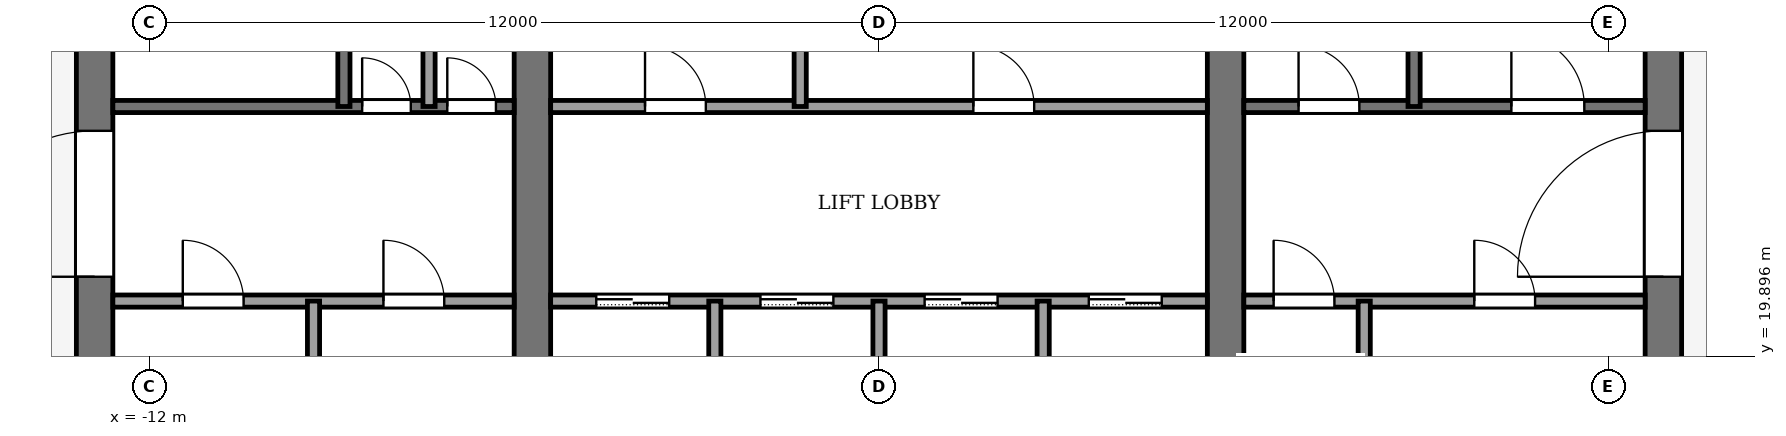
"""IFC4 building model, lengths in metres.
Left out: names, types, materials, properties, quantities, classifications, styles, units other than length and angle.
Written with IfcOpenShell. Run it as: python <this file> out.ifc"""

import sys

from ifc_helpers import new_model, si_unit, direction, frame, frame_2d, origin, place, context, subcontext, project, spatial, rectangle, extrude, element, fill, save


model = new_model("IFC4")
c1 = context("Model", 3, precision=1e-05, world=origin(), true_north=direction((0.0, 1.0)))
c2 = subcontext(c1, "Body", "Model", "MODEL_VIEW")
j1 = project(units=[si_unit("LENGTHUNIT", "METRE"), si_unit("PLANEANGLEUNIT", "RADIAN")], contexts=[c1])
p1 = place(None, origin())
s1 = spatial("IfcSite", under=j1, at=p1, CompositionType="ELEMENT")
p2 = place(p1, origin())
s2 = spatial("IfcBuilding", under=s1, at=p2, CompositionType="ELEMENT")
p3 = place(p2, frame((0.0, 0.0, 318.0)))
s3 = spatial("IfcBuildingStorey", under=s2, at=p3, CompositionType="ELEMENT", Elevation=318.0)
p4 = place(p3, frame((-12.9, 18.4, -0.13), z_axis=(0.0, 0.0, 1.0), x_axis=(0.0, 1.0, 0.0)))
e1 = element("IfcWall", 1, at=p4, inside=s3, PredefinedType="SHEAR", context=c2, shape_type="SweptSolid", body=[
    extrude(rectangle(XDim=19.2, YDim=0.6, at=frame_2d((9.6, 0.0))), origin(), (0.0, 0.0, 1.0), 4.0),
])
p5 = place(p4, frame((2.8, 0.0, 0.13)))
e2 = element("IfcOpeningElement", 2, at=p5, cuts=e1, PredefinedType="OPENING", context=c2, shape_type="SweptSolid", body=[
    extrude(rectangle(XDim=2.4, YDim=2.4, at=frame_2d((1.2, 1.2))), frame((0.0, 0.31, 0.0), z_axis=(0.0, -1.0, 0.0), x_axis=(1.0, 0.0, 0.0)), (0.0, 0.0, 1.0), 0.62),
])
p6 = place(p4, frame((13.4, 0.0, 0.13)))
e3 = element("IfcOpeningElement", 3, at=p6, cuts=e1, PredefinedType="OPENING", context=c2, shape_type="SweptSolid", body=[
    extrude(rectangle(XDim=1.4, YDim=2.2, at=frame_2d((0.7, 1.1))), frame((0.0, 0.31, 0.0), z_axis=(0.0, -1.0, 0.0), x_axis=(1.0, 0.0, 0.0)), (0.0, 0.0, 1.0), 0.62),
])
p7 = place(p3, frame((12.9, 18.4, -0.13), z_axis=(0.0, 0.0, 1.0), x_axis=(0.0, 1.0, 0.0)))
e4 = element("IfcWall", 4, at=p7, inside=s3, PredefinedType="SHEAR", context=c2, shape_type="SweptSolid", body=[
    extrude(rectangle(XDim=19.2, YDim=0.6, at=frame_2d((9.6, 0.0))), origin(), (0.0, 0.0, 1.0), 4.0),
])
p8 = place(p7, frame((2.8, 0.0, 0.13)))
e5 = element("IfcOpeningElement", 5, at=p8, cuts=e4, PredefinedType="OPENING", context=c2, shape_type="SweptSolid", body=[
    extrude(rectangle(XDim=2.4, YDim=2.4, at=frame_2d((1.2, 1.2))), frame((0.0, 0.31, 0.0), z_axis=(0.0, -1.0, 0.0), x_axis=(1.0, 0.0, 0.0)), (0.0, 0.0, 1.0), 0.62),
])
p9 = place(p7, frame((13.3, 0.0, 0.13)))
e6 = element("IfcOpeningElement", 6, at=p9, cuts=e4, PredefinedType="OPENING", context=c2, shape_type="SweptSolid", body=[
    extrude(rectangle(XDim=2.4, YDim=2.4, at=frame_2d((1.2, 1.2))), frame((0.0, 0.31, 0.0), z_axis=(0.0, -1.0, 0.0), x_axis=(1.0, 0.0, 0.0)), (0.0, 0.0, 1.0), 0.62),
])
p10 = place(p3, frame((-5.7, 18.4, -0.13), z_axis=(0.0, 0.0, 1.0), x_axis=(0.0, 1.0, 0.0)))
e7 = element("IfcWall", 7, at=p10, inside=s3, PredefinedType="SHEAR", context=c2, shape_type="SweptSolid", body=[
    extrude(rectangle(XDim=19.2, YDim=0.6, at=frame_2d((9.6, 0.0))), origin(), (0.0, 0.0, 1.0), 4.0),
])
p11 = place(p10, frame((8.35, 0.0, 0.13)))
e8 = element("IfcOpeningElement", 8, at=p11, cuts=e7, PredefinedType="OPENING", context=c2, shape_type="SweptSolid", body=[
    extrude(rectangle(XDim=0.9, YDim=2.1, at=frame_2d((0.45, 1.05))), frame((0.0, 0.31, 0.0), z_axis=(0.0, -1.0, 0.0), x_axis=(1.0, 0.0, 0.0)), (0.0, 0.0, 1.0), 0.62),
])
p12 = place(p3, frame((5.7, 18.4, -0.13), z_axis=(0.0, 0.0, 1.0), x_axis=(0.0, 1.0, 0.0)))
e9 = element("IfcWall", 9, at=p12, inside=s3, PredefinedType="SHEAR", context=c2, shape_type="SweptSolid", body=[
    extrude(rectangle(XDim=19.2, YDim=0.6, at=frame_2d((9.6, 0.0))), origin(), (0.0, 0.0, 1.0), 4.0),
])
p13 = place(p12, frame((8.35, 0.0, 0.13)))
e10 = element("IfcOpeningElement", 10, at=p13, cuts=e9, PredefinedType="OPENING", context=c2, shape_type="SweptSolid", body=[
    extrude(rectangle(XDim=0.9, YDim=2.1, at=frame_2d((0.45, 1.05))), frame((0.0, 0.31, 0.0), z_axis=(0.0, -1.0, 0.0), x_axis=(1.0, 0.0, 0.0)), (0.0, 0.0, 1.0), 0.62),
])
p14 = place(p12, frame((13.3, 0.0, 0.13)))
e11 = element("IfcOpeningElement", 11, at=p14, cuts=e9, PredefinedType="OPENING", context=c2, shape_type="SweptSolid", body=[
    extrude(rectangle(XDim=2.4, YDim=2.4, at=frame_2d((1.2, 1.2))), frame((0.0, 0.31, 0.0), z_axis=(0.0, -1.0, 0.0), x_axis=(1.0, 0.0, 0.0)), (0.0, 0.0, 1.0), 0.62),
])
p15 = place(p3, frame((-12.6, 20.8, 0.0), z_axis=(0.0, 0.0, 1.0), x_axis=(1.0, 0.0, 0.0)))
e12 = element("IfcWall", 12, at=p15, inside=s3, PredefinedType="PARTITIONING", context=c2, shape_type="SweptSolid", body=[
    extrude(rectangle(XDim=6.6, YDim=0.2, at=frame_2d((3.3, 0.0))), origin(), (0.0, 0.0, 1.0), 3.87),
])
p16 = place(p15, frame((1.15, 0.0, 0.0)))
e13 = element("IfcOpeningElement", 13, at=p16, cuts=e12, PredefinedType="OPENING", context=c2, shape_type="SweptSolid", body=[
    extrude(rectangle(XDim=1.0, YDim=2.1, at=frame_2d((0.5, 1.05))), frame((0.0, 0.11, 0.0), z_axis=(0.0, -1.0, 0.0), x_axis=(1.0, 0.0, 0.0)), (0.0, 0.0, 1.0), 0.22),
])
p17 = place(p15, frame((4.45, 0.0, 0.0)))
e14 = element("IfcOpeningElement", 14, at=p17, cuts=e12, PredefinedType="OPENING", context=c2, shape_type="SweptSolid", body=[
    extrude(rectangle(XDim=1.0, YDim=2.1, at=frame_2d((0.5, 1.05))), frame((0.0, 0.11, 0.0), z_axis=(0.0, -1.0, 0.0), x_axis=(1.0, 0.0, 0.0)), (0.0, 0.0, 1.0), 0.22),
])
p18 = place(p3, frame((-5.4, 20.8, 0.0), z_axis=(0.0, 0.0, 1.0), x_axis=(1.0, 0.0, 0.0)))
e15 = element("IfcWall", 15, at=p18, inside=s3, PredefinedType="PARTITIONING", context=c2, shape_type="SweptSolid", body=[
    extrude(rectangle(XDim=10.8, YDim=0.2, at=frame_2d((5.4, 0.0))), origin(), (0.0, 0.0, 1.0), 3.87),
])
p19 = place(p18, frame((0.75, 0.0, 0.0)))
e16 = element("IfcOpeningElement", 16, at=p19, cuts=e15, PredefinedType="OPENING", context=c2, shape_type="SweptSolid", body=[
    extrude(rectangle(XDim=1.2, YDim=2.2, at=frame_2d((0.6, 1.1))), frame((0.0, 0.11, 0.0), z_axis=(0.0, -1.0, 0.0), x_axis=(1.0, 0.0, 0.0)), (0.0, 0.0, 1.0), 0.22),
])
p20 = place(p18, frame((3.45, 0.0, 0.0)))
e17 = element("IfcOpeningElement", 17, at=p20, cuts=e15, PredefinedType="OPENING", context=c2, shape_type="SweptSolid", body=[
    extrude(rectangle(XDim=1.2, YDim=2.2, at=frame_2d((0.6, 1.1))), frame((0.0, 0.11, 0.0), z_axis=(0.0, -1.0, 0.0), x_axis=(1.0, 0.0, 0.0)), (0.0, 0.0, 1.0), 0.22),
])
p21 = place(p18, frame((6.15, 0.0, 0.0)))
e18 = element("IfcOpeningElement", 18, at=p21, cuts=e15, PredefinedType="OPENING", context=c2, shape_type="SweptSolid", body=[
    extrude(rectangle(XDim=1.2, YDim=2.2, at=frame_2d((0.6, 1.1))), frame((0.0, 0.11, 0.0), z_axis=(0.0, -1.0, 0.0), x_axis=(1.0, 0.0, 0.0)), (0.0, 0.0, 1.0), 0.22),
])
p22 = place(p18, frame((8.85, 0.0, 0.0)))
e19 = element("IfcOpeningElement", 19, at=p22, cuts=e15, PredefinedType="OPENING", context=c2, shape_type="SweptSolid", body=[
    extrude(rectangle(XDim=1.2, YDim=2.2, at=frame_2d((0.6, 1.1))), frame((0.0, 0.11, 0.0), z_axis=(0.0, -1.0, 0.0), x_axis=(1.0, 0.0, 0.0)), (0.0, 0.0, 1.0), 0.22),
])
p23 = place(p3, frame((6.0, 20.8, 0.0), z_axis=(0.0, 0.0, 1.0), x_axis=(1.0, 0.0, 0.0)))
e20 = element("IfcWall", 20, at=p23, inside=s3, PredefinedType="PARTITIONING", context=c2, shape_type="SweptSolid", body=[
    extrude(rectangle(XDim=6.6, YDim=0.2, at=frame_2d((3.3, 0.0))), origin(), (0.0, 0.0, 1.0), 3.87),
])
p24 = place(p23, frame((0.49, 0.0, 0.0)))
e21 = element("IfcOpeningElement", 21, at=p24, cuts=e20, PredefinedType="OPENING", context=c2, shape_type="SweptSolid", body=[
    extrude(rectangle(XDim=1.0, YDim=2.1, at=frame_2d((0.5, 1.05))), frame((0.0, 0.11, 0.0), z_axis=(0.0, -1.0, 0.0), x_axis=(1.0, 0.0, 0.0)), (0.0, 0.0, 1.0), 0.22),
])
p25 = place(p23, frame((3.79, 0.0, 0.0)))
e22 = element("IfcOpeningElement", 22, at=p25, cuts=e20, PredefinedType="OPENING", context=c2, shape_type="SweptSolid", body=[
    extrude(rectangle(XDim=1.0, YDim=2.1, at=frame_2d((0.5, 1.05))), frame((0.0, 0.11, 0.0), z_axis=(0.0, -1.0, 0.0), x_axis=(1.0, 0.0, 0.0)), (0.0, 0.0, 1.0), 0.22),
])
p26 = place(p3, frame((-12.6, 24.0, 0.0), z_axis=(0.0, 0.0, 1.0), x_axis=(1.0, 0.0, 0.0)))
e23 = element("IfcWall", 23, at=p26, inside=s3, PredefinedType="PARTITIONING", context=c2, shape_type="SweptSolid", body=[
    extrude(rectangle(XDim=6.6, YDim=0.2, at=frame_2d((3.3, 0.0))), origin(), (0.0, 0.0, 1.0), 3.87),
])
p27 = place(p26, frame((4.1, 0.0, 0.0)))
e24 = element("IfcOpeningElement", 24, at=p27, cuts=e23, PredefinedType="OPENING", context=c2, shape_type="SweptSolid", body=[
    extrude(rectangle(XDim=0.8, YDim=2.1, at=frame_2d((0.4, 1.05))), frame((0.0, 0.11, 0.0), z_axis=(0.0, -1.0, 0.0), x_axis=(1.0, 0.0, 0.0)), (0.0, 0.0, 1.0), 0.22),
])
p28 = place(p26, frame((5.5, 0.0, 0.0)))
e25 = element("IfcOpeningElement", 25, at=p28, cuts=e23, PredefinedType="OPENING", context=c2, shape_type="SweptSolid", body=[
    extrude(rectangle(XDim=0.8, YDim=2.1, at=frame_2d((0.4, 1.05))), frame((0.0, 0.11, 0.0), z_axis=(0.0, -1.0, 0.0), x_axis=(1.0, 0.0, 0.0)), (0.0, 0.0, 1.0), 0.22),
])
p29 = place(p3, frame((-5.4, 24.0, 0.0), z_axis=(0.0, 0.0, 1.0), x_axis=(1.0, 0.0, 0.0)))
e26 = element("IfcWall", 26, at=p29, inside=s3, PredefinedType="PARTITIONING", context=c2, shape_type="SweptSolid", body=[
    extrude(rectangle(XDim=10.8, YDim=0.2, at=frame_2d((5.4, 0.0))), origin(), (0.0, 0.0, 1.0), 3.87),
])
p30 = place(p29, frame((1.552, 0.0, 0.0)))
e27 = element("IfcOpeningElement", 27, at=p30, cuts=e26, PredefinedType="OPENING", context=c2, shape_type="SweptSolid", body=[
    extrude(rectangle(XDim=1.0, YDim=2.1, at=frame_2d((0.5, 1.05))), frame((0.0, 0.11, 0.0), z_axis=(0.0, -1.0, 0.0), x_axis=(1.0, 0.0, 0.0)), (0.0, 0.0, 1.0), 0.22),
])
p31 = place(p29, frame((6.952, 0.0, 0.0)))
e28 = element("IfcOpeningElement", 28, at=p31, cuts=e26, PredefinedType="OPENING", context=c2, shape_type="SweptSolid", body=[
    extrude(rectangle(XDim=1.0, YDim=2.1, at=frame_2d((0.5, 1.05))), frame((0.0, 0.11, 0.0), z_axis=(0.0, -1.0, 0.0), x_axis=(1.0, 0.0, 0.0)), (0.0, 0.0, 1.0), 0.22),
])
p32 = place(p3, frame((6.0, 24.0, 0.0), z_axis=(0.0, 0.0, 1.0), x_axis=(1.0, 0.0, 0.0)))
e29 = element("IfcWall", 29, at=p32, inside=s3, PredefinedType="PARTITIONING", context=c2, shape_type="SweptSolid", body=[
    extrude(rectangle(XDim=6.6, YDim=0.2, at=frame_2d((3.3, 0.0))), origin(), (0.0, 0.0, 1.0), 3.87),
])
p33 = place(p32, frame((0.9, 0.0, 0.0)))
e30 = element("IfcOpeningElement", 30, at=p33, cuts=e29, PredefinedType="OPENING", context=c2, shape_type="SweptSolid", body=[
    extrude(rectangle(XDim=1.0, YDim=2.1, at=frame_2d((0.5, 1.05))), frame((0.0, 0.11, 0.0), z_axis=(0.0, -1.0, 0.0), x_axis=(1.0, 0.0, 0.0)), (0.0, 0.0, 1.0), 0.22),
])
p34 = place(p32, frame((4.4, 0.0, 0.0)))
e31 = element("IfcOpeningElement", 31, at=p34, cuts=e29, PredefinedType="OPENING", context=c2, shape_type="SweptSolid", body=[
    extrude(rectangle(XDim=1.2, YDim=2.2, at=frame_2d((0.6, 1.1))), frame((0.0, 0.11, 0.0), z_axis=(0.0, -1.0, 0.0), x_axis=(1.0, 0.0, 0.0)), (0.0, 0.0, 1.0), 0.22),
])
p35 = place(p3, frame((-9.3, 18.4, 0.0), z_axis=(0.0, 0.0, 1.0), x_axis=(0.0, 1.0, 0.0)))
e32 = element("IfcWall", 32, at=p35, inside=s3, PredefinedType="PARTITIONING", context=c2, shape_type="SweptSolid", body=[
    extrude(rectangle(XDim=2.4, YDim=0.2, at=frame_2d((1.2, 0.0))), origin(), (0.0, 0.0, 1.0), 3.87),
])
for number, where, z_axis, x_axis in (
    (33, (-8.8, 24.0, 0.0), (0.0, 0.0, 1.0), (0.0, 1.0, 0.0)),
    (34, (-7.4, 24.0, 0.0), (0.0, 0.0, 1.0), (0.0, 1.0, 0.0)),
):
    element("IfcWall", number, at=place(p3, frame(where, z_axis=z_axis, x_axis=x_axis)), inside=s3, PredefinedType="PARTITIONING", context=c2, shape_type="SweptSolid", body=[
        extrude(rectangle(XDim=7.4, YDim=0.2, at=frame_2d((3.7, 0.0))), origin(), (0.0, 0.0, 1.0), 3.87),
    ])
p36 = place(p3, frame((-2.7, 18.4, 0.0), z_axis=(0.0, 0.0, 1.0), x_axis=(0.0, 1.0, 0.0)))
e35 = element("IfcWall", 35, at=p36, inside=s3, PredefinedType="PARTITIONING", context=c2, shape_type="SweptSolid", body=[
    extrude(rectangle(XDim=2.4, YDim=0.2, at=frame_2d((1.2, 0.0))), origin(), (0.0, 0.0, 1.0), 3.87),
])
p37 = place(p3, frame((-1.296, 24.0, 0.0), z_axis=(0.0, 0.0, 1.0), x_axis=(0.0, 1.0, 0.0)))
e36 = element("IfcWall", 36, at=p37, inside=s3, PredefinedType="PARTITIONING", context=c2, shape_type="SweptSolid", body=[
    extrude(rectangle(XDim=2.4, YDim=0.2, at=frame_2d((1.2, 0.0))), origin(), (0.0, 0.0, 1.0), 3.87),
])
for number, where, z_axis, x_axis in (
    (37, (0.0, 18.4, 0.0), (0.0, 0.0, 1.0), (0.0, 1.0, 0.0)),
    (38, (2.7, 18.4, 0.0), (0.0, 0.0, 1.0), (0.0, 1.0, 0.0)),
    (39, (7.98, 18.4, 0.0), (0.0, 0.0, 1.0), (0.0, 1.0, 0.0)),
):
    element("IfcWall", number, at=place(p3, frame(where, z_axis=z_axis, x_axis=x_axis)), inside=s3, PredefinedType="PARTITIONING", context=c2, shape_type="SweptSolid", body=[
        extrude(rectangle(XDim=2.4, YDim=0.2, at=frame_2d((1.2, 0.0))), origin(), (0.0, 0.0, 1.0), 3.87),
    ])
p38 = place(p3, frame((8.8, 24.0, 0.0), z_axis=(0.0, 0.0, 1.0), x_axis=(0.0, 1.0, 0.0)))
e40 = element("IfcWall", 40, at=p38, inside=s3, PredefinedType="PARTITIONING", context=c2, shape_type="SweptSolid", body=[
    extrude(rectangle(XDim=7.4, YDim=0.2, at=frame_2d((3.7, 0.0))), origin(), (0.0, 0.0, 1.0), 3.87),
])
p39 = place(p19, origin())
e41 = element("IfcDoor", 41, at=p39, inside=s3, OperationType="SLIDING_TO_LEFT", PredefinedType="DOOR", context=c2, shape_type="SweptSolid", body=[
    extrude(rectangle(XDim=1.2, YDim=2.2, at=frame_2d((0.6, 1.1))), frame((0.0, 0.025, 0.0), z_axis=(0.0, -1.0, 0.0), x_axis=(1.0, 0.0, 0.0)), (0.0, 0.0, 1.0), 0.05),
])
fill(e16, e41)
p40 = place(p20, origin())
e42 = element("IfcDoor", 42, at=p40, inside=s3, OperationType="SLIDING_TO_LEFT", PredefinedType="DOOR", context=c2, shape_type="SweptSolid", body=[
    extrude(rectangle(XDim=1.2, YDim=2.2, at=frame_2d((0.6, 1.1))), frame((0.0, 0.025, 0.0), z_axis=(0.0, -1.0, 0.0), x_axis=(1.0, 0.0, 0.0)), (0.0, 0.0, 1.0), 0.05),
])
fill(e17, e42)
p41 = place(p21, origin())
e43 = element("IfcDoor", 43, at=p41, inside=s3, OperationType="SLIDING_TO_LEFT", PredefinedType="DOOR", context=c2, shape_type="SweptSolid", body=[
    extrude(rectangle(XDim=1.2, YDim=2.2, at=frame_2d((0.6, 1.1))), frame((0.0, 0.025, 0.0), z_axis=(0.0, -1.0, 0.0), x_axis=(1.0, 0.0, 0.0)), (0.0, 0.0, 1.0), 0.05),
])
fill(e18, e43)
p42 = place(p22, origin())
e44 = element("IfcDoor", 44, at=p42, inside=s3, OperationType="SLIDING_TO_LEFT", PredefinedType="DOOR", context=c2, shape_type="SweptSolid", body=[
    extrude(rectangle(XDim=1.2, YDim=2.2, at=frame_2d((0.6, 1.1))), frame((0.0, 0.025, 0.0), z_axis=(0.0, -1.0, 0.0), x_axis=(1.0, 0.0, 0.0)), (0.0, 0.0, 1.0), 0.05),
])
fill(e19, e44)
p43 = place(p30, origin())
e45 = element("IfcDoor", 45, at=p43, inside=s3, OperationType="SINGLE_SWING_LEFT", PredefinedType="DOOR", context=c2, shape_type="SweptSolid", body=[
    extrude(rectangle(XDim=1.0, YDim=2.1, at=frame_2d((0.5, 1.05))), frame((0.0, 0.025, 0.0), z_axis=(0.0, -1.0, 0.0), x_axis=(1.0, 0.0, 0.0)), (0.0, 0.0, 1.0), 0.05),
])
fill(e27, e45)
p44 = place(p31, origin())
e46 = element("IfcDoor", 46, at=p44, inside=s3, OperationType="SINGLE_SWING_RIGHT", PredefinedType="DOOR", context=c2, shape_type="SweptSolid", body=[
    extrude(rectangle(XDim=1.0, YDim=2.1, at=frame_2d((0.5, 1.05))), frame((0.0, 0.025, 0.0), z_axis=(0.0, -1.0, 0.0), x_axis=(1.0, 0.0, 0.0)), (0.0, 0.0, 1.0), 0.05),
])
fill(e28, e46)
p45 = place(p16, origin())
e47 = element("IfcDoor", 47, at=p45, inside=s3, OperationType="SINGLE_SWING_LEFT", PredefinedType="DOOR", context=c2, shape_type="SweptSolid", body=[
    extrude(rectangle(XDim=1.0, YDim=2.1, at=frame_2d((0.5, 1.05))), frame((0.0, 0.025, 0.0), z_axis=(0.0, -1.0, 0.0), x_axis=(1.0, 0.0, 0.0)), (0.0, 0.0, 1.0), 0.05),
])
fill(e13, e47)
p46 = place(p17, origin())
e48 = element("IfcDoor", 48, at=p46, inside=s3, OperationType="SINGLE_SWING_LEFT", PredefinedType="DOOR", context=c2, shape_type="SweptSolid", body=[
    extrude(rectangle(XDim=1.0, YDim=2.1, at=frame_2d((0.5, 1.05))), frame((0.0, 0.025, 0.0), z_axis=(0.0, -1.0, 0.0), x_axis=(1.0, 0.0, 0.0)), (0.0, 0.0, 1.0), 0.05),
])
fill(e14, e48)
p47 = place(p24, origin())
e49 = element("IfcDoor", 49, at=p47, inside=s3, OperationType="SINGLE_SWING_RIGHT", PredefinedType="DOOR", context=c2, shape_type="SweptSolid", body=[
    extrude(rectangle(XDim=1.0, YDim=2.1, at=frame_2d((0.5, 1.05))), frame((0.0, 0.025, 0.0), z_axis=(0.0, -1.0, 0.0), x_axis=(1.0, 0.0, 0.0)), (0.0, 0.0, 1.0), 0.05),
])
fill(e21, e49)
p48 = place(p25, origin())
e50 = element("IfcDoor", 50, at=p48, inside=s3, OperationType="SINGLE_SWING_RIGHT", PredefinedType="DOOR", context=c2, shape_type="SweptSolid", body=[
    extrude(rectangle(XDim=1.0, YDim=2.1, at=frame_2d((0.5, 1.05))), frame((0.0, 0.025, 0.0), z_axis=(0.0, -1.0, 0.0), x_axis=(1.0, 0.0, 0.0)), (0.0, 0.0, 1.0), 0.05),
])
fill(e22, e50)
p49 = place(p27, origin())
e51 = element("IfcDoor", 51, at=p49, inside=s3, OperationType="SINGLE_SWING_LEFT", PredefinedType="DOOR", context=c2, shape_type="SweptSolid", body=[
    extrude(rectangle(XDim=0.8, YDim=2.1, at=frame_2d((0.4, 1.05))), frame((0.0, 0.025, 0.0), z_axis=(0.0, -1.0, 0.0), x_axis=(1.0, 0.0, 0.0)), (0.0, 0.0, 1.0), 0.05),
])
fill(e24, e51)
p50 = place(p28, origin())
e52 = element("IfcDoor", 52, at=p50, inside=s3, OperationType="SINGLE_SWING_RIGHT", PredefinedType="DOOR", context=c2, shape_type="SweptSolid", body=[
    extrude(rectangle(XDim=0.8, YDim=2.1, at=frame_2d((0.4, 1.05))), frame((0.0, 0.025, 0.0), z_axis=(0.0, -1.0, 0.0), x_axis=(1.0, 0.0, 0.0)), (0.0, 0.0, 1.0), 0.05),
])
fill(e25, e52)
p51 = place(p33, origin())
e53 = element("IfcDoor", 53, at=p51, inside=s3, OperationType="SINGLE_SWING_RIGHT", PredefinedType="DOOR", context=c2, shape_type="SweptSolid", body=[
    extrude(rectangle(XDim=1.0, YDim=2.1, at=frame_2d((0.5, 1.05))), frame((0.0, 0.025, 0.0), z_axis=(0.0, -1.0, 0.0), x_axis=(1.0, 0.0, 0.0)), (0.0, 0.0, 1.0), 0.05),
])
fill(e30, e53)
p52 = place(p34, origin())
e54 = element("IfcDoor", 54, at=p52, inside=s3, OperationType="SINGLE_SWING_LEFT", PredefinedType="DOOR", context=c2, shape_type="SweptSolid", body=[
    extrude(rectangle(XDim=1.2, YDim=2.2, at=frame_2d((0.6, 1.1))), frame((0.0, 0.025, 0.0), z_axis=(0.0, -1.0, 0.0), x_axis=(1.0, 0.0, 0.0)), (0.0, 0.0, 1.0), 0.05),
])
fill(e31, e54)
p53 = place(p5, origin())
e55 = element("IfcDoor", 55, at=p53, inside=s3, OperationType="DOUBLE_DOOR_SINGLE_SWING", PredefinedType="DOOR", context=c2, shape_type="SweptSolid", body=[
    extrude(rectangle(XDim=2.4, YDim=2.4, at=frame_2d((1.2, 1.2))), frame((0.0, 0.025, 0.0), z_axis=(0.0, -1.0, 0.0), x_axis=(1.0, 0.0, 0.0)), (0.0, 0.0, 1.0), 0.05),
])
fill(e2, e55)
p54 = place(p8, origin())
e56 = element("IfcDoor", 56, at=p54, inside=s3, OperationType="DOUBLE_DOOR_SINGLE_SWING", PredefinedType="DOOR", context=c2, shape_type="SweptSolid", body=[
    extrude(rectangle(XDim=2.4, YDim=2.4, at=frame_2d((1.2, 1.2))), frame((0.0, 0.025, 0.0), z_axis=(0.0, -1.0, 0.0), x_axis=(1.0, 0.0, 0.0)), (0.0, 0.0, 1.0), 0.05),
])
fill(e5, e56)
save(model, sys.argv[1])
